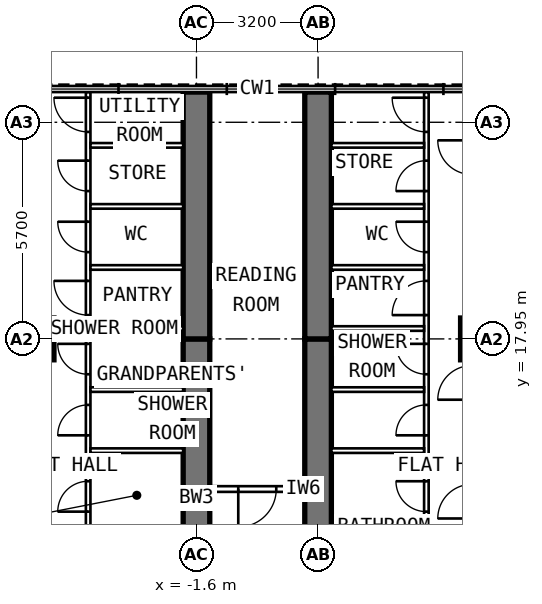
"""IFC4 building model, lengths in metres.
Left out: names, types, materials, properties, quantities, classifications, styles, units other than length and angle.
Written with IfcOpenShell. Run it as: python <this file> out.ifc"""

import sys

from ifc_helpers import new_model, si_unit, direction, frame, frame_2d, origin, origin_2d, place, context, subcontext, project, spatial, rectangle, extrude, element, fill, save


model = new_model("IFC4")
c1 = context("Model", 3, precision=1e-05, world=origin(), true_north=direction((0.0, 1.0)))
c2 = subcontext(c1, "Body", "Model", "MODEL_VIEW")
j1 = project(units=[si_unit("LENGTHUNIT", "METRE"), si_unit("PLANEANGLEUNIT", "RADIAN")], contexts=[c1])
p1 = place(None, origin())
s1 = spatial("IfcSite", under=j1, at=p1, CompositionType="ELEMENT")
p2 = place(p1, origin())
s2 = spatial("IfcBuilding", under=s1, at=p2, CompositionType="ELEMENT")
p3 = place(p2, frame((0.0, 0.0, 231.6)))
s3 = spatial("IfcBuildingStorey", under=s2, at=p3, CompositionType="ELEMENT", Elevation=231.6)
for number, where, z_axis, x_axis in (
    (1, (-5.9, 17.95, 0.0), (0.0, 0.0, 1.0), (0.0, 1.0, 0.0)),
    (2, (5.9, 17.95, 0.0), (0.0, 0.0, 1.0), (0.0, 1.0, 0.0)),
):
    element("IfcColumn", number, at=place(p3, frame(where, z_axis=z_axis, x_axis=x_axis)), inside=s3, PredefinedType="COLUMN", context=c2, shape_type="SweptSolid", body=[
        extrude(rectangle(XDim=1.1, YDim=1.1, at=origin_2d()), origin(), (0.0, 0.0, 1.0), 3.6),
    ])
p4 = place(p3, frame((-1.6, 9.6, 0.0), z_axis=(0.0, 0.0, 1.0), x_axis=(0.0, 1.0, 0.0)))
e3 = element("IfcWall", 3, at=p4, inside=s3, PredefinedType="SHEAR", context=c2, shape_type="SweptSolid", body=[
    extrude(rectangle(XDim=8.35, YDim=0.7, at=frame_2d((4.175, 0.0))), origin(), (0.0, 0.0, 1.0), 3.6),
])
p5 = place(p4, frame((1.3, 0.0, 0.0)))
e4 = element("IfcOpeningElement", 4, at=p5, cuts=e3, PredefinedType="OPENING", context=c2, shape_type="SweptSolid", body=[
    extrude(rectangle(XDim=1.0, YDim=2.1, at=frame_2d((0.5, 1.05))), frame((0.0, 0.362, 0.0), z_axis=(0.0, -1.0, 0.0), x_axis=(1.0, 0.0, 0.0)), (0.0, 0.0, 1.0), 0.724),
])
p6 = place(p3, frame((-1.6, 17.95, 0.0), z_axis=(0.0, 0.0, 1.0), x_axis=(0.0, 1.0, 0.0)))
e5 = element("IfcWall", 5, at=p6, inside=s3, PredefinedType="SHEAR", context=c2, shape_type="SweptSolid", body=[
    extrude(rectangle(XDim=6.495, YDim=0.7, at=frame_2d((3.248, 0.0))), origin(), (0.0, 0.0, 1.0), 3.6),
])
p7 = place(p3, frame((1.6, 9.6, 0.0), z_axis=(0.0, 0.0, 1.0), x_axis=(0.0, 1.0, 0.0)))
e6 = element("IfcWall", 6, at=p7, inside=s3, PredefinedType="SHEAR", context=c2, shape_type="SweptSolid", body=[
    extrude(rectangle(XDim=8.35, YDim=0.7, at=frame_2d((4.175, 0.0))), origin(), (0.0, 0.0, 1.0), 3.6),
])
p8 = place(p7, frame((1.3, 0.0, 0.0)))
e7 = element("IfcOpeningElement", 7, at=p8, cuts=e6, PredefinedType="OPENING", context=c2, shape_type="SweptSolid", body=[
    extrude(rectangle(XDim=1.0, YDim=2.1, at=frame_2d((0.5, 1.05))), frame((0.0, 0.362, 0.0), z_axis=(0.0, -1.0, 0.0), x_axis=(1.0, 0.0, 0.0)), (0.0, 0.0, 1.0), 0.724),
])
p9 = place(p3, frame((1.6, 17.95, 0.0), z_axis=(0.0, 0.0, 1.0), x_axis=(0.0, 1.0, 0.0)))
e8 = element("IfcWall", 8, at=p9, inside=s3, PredefinedType="SHEAR", context=c2, shape_type="SweptSolid", body=[
    extrude(rectangle(XDim=6.495, YDim=0.7, at=frame_2d((3.248, 0.0))), origin(), (0.0, 0.0, 1.0), 3.6),
])
p10 = place(p3, frame((-4.45, 9.9, 0.0), z_axis=(0.0, 0.0, 1.0), x_axis=(0.0, 1.0, 0.0)))
e9 = element("IfcWall", 9, at=p10, inside=s3, PredefinedType="PARTITIONING", context=c2, shape_type="SweptSolid", body=[
    extrude(rectangle(XDim=14.545, YDim=0.12, at=frame_2d((7.272, 0.0))), origin(), (0.0, 0.0, 1.0), 3.35),
])
p11 = place(p10, frame((0.95, 0.0, 0.0)))
e10 = element("IfcOpeningElement", 10, at=p11, cuts=e9, PredefinedType="OPENING", context=c2, shape_type="SweptSolid", body=[
    extrude(rectangle(XDim=0.9, YDim=2.1, at=frame_2d((0.45, 1.05))), frame((0.0, 0.072, 0.0), z_axis=(0.0, -1.0, 0.0), x_axis=(1.0, 0.0, 0.0)), (0.0, 0.0, 1.0), 0.144),
])
p12 = place(p10, frame((3.505, 0.0, 0.0)))
e11 = element("IfcOpeningElement", 11, at=p12, cuts=e9, PredefinedType="OPENING", context=c2, shape_type="SweptSolid", body=[
    extrude(rectangle(XDim=0.8, YDim=2.1, at=frame_2d((0.4, 1.05))), frame((0.0, 0.072, 0.0), z_axis=(0.0, -1.0, 0.0), x_axis=(1.0, 0.0, 0.0)), (0.0, 0.0, 1.0), 0.144),
])
p13 = place(p10, frame((5.513, 0.0, 0.0)))
e12 = element("IfcOpeningElement", 12, at=p13, cuts=e9, PredefinedType="OPENING", context=c2, shape_type="SweptSolid", body=[
    extrude(rectangle(XDim=0.8, YDim=2.1, at=frame_2d((0.4, 1.05))), frame((0.0, 0.072, 0.0), z_axis=(0.0, -1.0, 0.0), x_axis=(1.0, 0.0, 0.0)), (0.0, 0.0, 1.0), 0.144),
])
p14 = place(p10, frame((7.12, 0.0, 0.0)))
e13 = element("IfcOpeningElement", 13, at=p14, cuts=e9, PredefinedType="OPENING", context=c2, shape_type="SweptSolid", body=[
    extrude(rectangle(XDim=0.8, YDim=2.1, at=frame_2d((0.4, 1.05))), frame((0.0, 0.072, 0.0), z_axis=(0.0, -1.0, 0.0), x_axis=(1.0, 0.0, 0.0)), (0.0, 0.0, 1.0), 0.144),
])
p15 = place(p10, frame((8.677, 0.0, 0.0)))
e14 = element("IfcOpeningElement", 14, at=p15, cuts=e9, PredefinedType="OPENING", context=c2, shape_type="SweptSolid", body=[
    extrude(rectangle(XDim=0.9, YDim=2.1, at=frame_2d((0.45, 1.05))), frame((0.0, 0.072, 0.0), z_axis=(0.0, -1.0, 0.0), x_axis=(1.0, 0.0, 0.0)), (0.0, 0.0, 1.0), 0.144),
])
p16 = place(p10, frame((10.333, 0.0, 0.0)))
e15 = element("IfcOpeningElement", 15, at=p16, cuts=e9, PredefinedType="OPENING", context=c2, shape_type="SweptSolid", body=[
    extrude(rectangle(XDim=0.8, YDim=2.1, at=frame_2d((0.4, 1.05))), frame((0.0, 0.072, 0.0), z_axis=(0.0, -1.0, 0.0), x_axis=(1.0, 0.0, 0.0)), (0.0, 0.0, 1.0), 0.144),
])
p17 = place(p10, frame((11.94, 0.0, 0.0)))
e16 = element("IfcOpeningElement", 16, at=p17, cuts=e9, PredefinedType="OPENING", context=c2, shape_type="SweptSolid", body=[
    extrude(rectangle(XDim=0.8, YDim=2.1, at=frame_2d((0.4, 1.05))), frame((0.0, 0.072, 0.0), z_axis=(0.0, -1.0, 0.0), x_axis=(1.0, 0.0, 0.0)), (0.0, 0.0, 1.0), 0.144),
])
p18 = place(p10, frame((13.497, 0.0, 0.0)))
e17 = element("IfcOpeningElement", 17, at=p18, cuts=e9, PredefinedType="OPENING", context=c2, shape_type="SweptSolid", body=[
    extrude(rectangle(XDim=0.9, YDim=2.1, at=frame_2d((0.45, 1.05))), frame((0.0, 0.072, 0.0), z_axis=(0.0, -1.0, 0.0), x_axis=(1.0, 0.0, 0.0)), (0.0, 0.0, 1.0), 0.144),
])
for number, where, z_axis, x_axis in (
    (18, (-1.95, 15.01, 0.0), (0.0, 0.0, 1.0), (-1.0, 0.0, 0.0)),
    (19, (-1.95, 16.617, 0.0), (0.0, 0.0, 1.0), (-1.0, 0.0, 0.0)),
):
    element("IfcWall", number, at=place(p3, frame(where, z_axis=z_axis, x_axis=x_axis)), inside=s3, PredefinedType="PARTITIONING", context=c2, shape_type="SweptSolid", body=[
        extrude(rectangle(XDim=2.44, YDim=0.12, at=frame_2d((1.22, 0.0))), origin(), (0.0, 0.0, 1.0), 3.35),
    ])
p19 = place(p3, frame((-1.95, 18.223, 0.0), z_axis=(0.0, 0.0, 1.0), x_axis=(-1.0, 0.0, 0.0)))
e20 = element("IfcWall", 20, at=p19, inside=s3, PredefinedType="PARTITIONING", context=c2, shape_type="SweptSolid", body=[
    extrude(rectangle(XDim=2.44, YDim=0.12, at=frame_2d((1.22, 0.0))), origin(), (0.0, 0.0, 1.0), 2.45),
])
for number, where, z_axis, x_axis in (
    (21, (-1.95, 19.83, 0.0), (0.0, 0.0, 1.0), (-1.0, 0.0, 0.0)),
    (22, (-1.95, 21.437, 0.0), (0.0, 0.0, 1.0), (-1.0, 0.0, 0.0)),
    (23, (-1.95, 23.043, 0.0), (0.0, 0.0, 1.0), (-1.0, 0.0, 0.0)),
):
    element("IfcWall", number, at=place(p3, frame(where, z_axis=z_axis, x_axis=x_axis)), inside=s3, PredefinedType="PARTITIONING", context=c2, shape_type="SweptSolid", body=[
        extrude(rectangle(XDim=2.44, YDim=0.12, at=frame_2d((1.22, 0.0))), origin(), (0.0, 0.0, 1.0), 3.35),
    ])
p20 = place(p3, frame((4.45, 9.9, 0.0), z_axis=(0.0, 0.0, 1.0), x_axis=(0.0, 1.0, 0.0)))
e24 = element("IfcWall", 24, at=p20, inside=s3, PredefinedType="PARTITIONING", context=c2, shape_type="SweptSolid", body=[
    extrude(rectangle(XDim=14.545, YDim=0.12, at=frame_2d((7.272, 0.0))), origin(), (0.0, 0.0, 1.0), 3.35),
])
p21 = place(p20, frame((0.95, 0.0, 0.0)))
e25 = element("IfcOpeningElement", 25, at=p21, cuts=e24, PredefinedType="OPENING", context=c2, shape_type="SweptSolid", body=[
    extrude(rectangle(XDim=0.9, YDim=2.1, at=frame_2d((0.45, 1.05))), frame((0.0, 0.072, 0.0), z_axis=(0.0, -1.0, 0.0), x_axis=(1.0, 0.0, 0.0)), (0.0, 0.0, 1.0), 0.144),
])
p22 = place(p20, frame((3.505, 0.0, 0.0)))
e26 = element("IfcOpeningElement", 26, at=p22, cuts=e24, PredefinedType="OPENING", context=c2, shape_type="SweptSolid", body=[
    extrude(rectangle(XDim=0.8, YDim=2.1, at=frame_2d((0.4, 1.05))), frame((0.0, 0.072, 0.0), z_axis=(0.0, -1.0, 0.0), x_axis=(1.0, 0.0, 0.0)), (0.0, 0.0, 1.0), 0.144),
])
p23 = place(p20, frame((5.513, 0.0, 0.0)))
e27 = element("IfcOpeningElement", 27, at=p23, cuts=e24, PredefinedType="OPENING", context=c2, shape_type="SweptSolid", body=[
    extrude(rectangle(XDim=0.8, YDim=2.1, at=frame_2d((0.4, 1.05))), frame((0.0, 0.072, 0.0), z_axis=(0.0, -1.0, 0.0), x_axis=(1.0, 0.0, 0.0)), (0.0, 0.0, 1.0), 0.144),
])
p24 = place(p20, frame((7.12, 0.0, 0.0)))
e28 = element("IfcOpeningElement", 28, at=p24, cuts=e24, PredefinedType="OPENING", context=c2, shape_type="SweptSolid", body=[
    extrude(rectangle(XDim=0.8, YDim=2.1, at=frame_2d((0.4, 1.05))), frame((0.0, 0.072, 0.0), z_axis=(0.0, -1.0, 0.0), x_axis=(1.0, 0.0, 0.0)), (0.0, 0.0, 1.0), 0.144),
])
p25 = place(p20, frame((8.677, 0.0, 0.0)))
e29 = element("IfcOpeningElement", 29, at=p25, cuts=e24, PredefinedType="OPENING", context=c2, shape_type="SweptSolid", body=[
    extrude(rectangle(XDim=0.9, YDim=2.1, at=frame_2d((0.45, 1.05))), frame((0.0, 0.072, 0.0), z_axis=(0.0, -1.0, 0.0), x_axis=(1.0, 0.0, 0.0)), (0.0, 0.0, 1.0), 0.144),
])
p26 = place(p20, frame((10.333, 0.0, 0.0)))
e30 = element("IfcOpeningElement", 30, at=p26, cuts=e24, PredefinedType="OPENING", context=c2, shape_type="SweptSolid", body=[
    extrude(rectangle(XDim=0.8, YDim=2.1, at=frame_2d((0.4, 1.05))), frame((0.0, 0.072, 0.0), z_axis=(0.0, -1.0, 0.0), x_axis=(1.0, 0.0, 0.0)), (0.0, 0.0, 1.0), 0.144),
])
p27 = place(p20, frame((11.94, 0.0, 0.0)))
e31 = element("IfcOpeningElement", 31, at=p27, cuts=e24, PredefinedType="OPENING", context=c2, shape_type="SweptSolid", body=[
    extrude(rectangle(XDim=0.8, YDim=2.1, at=frame_2d((0.4, 1.05))), frame((0.0, 0.072, 0.0), z_axis=(0.0, -1.0, 0.0), x_axis=(1.0, 0.0, 0.0)), (0.0, 0.0, 1.0), 0.144),
])
p28 = place(p20, frame((13.497, 0.0, 0.0)))
e32 = element("IfcOpeningElement", 32, at=p28, cuts=e24, PredefinedType="OPENING", context=c2, shape_type="SweptSolid", body=[
    extrude(rectangle(XDim=0.9, YDim=2.1, at=frame_2d((0.45, 1.05))), frame((0.0, 0.072, 0.0), z_axis=(0.0, -1.0, 0.0), x_axis=(1.0, 0.0, 0.0)), (0.0, 0.0, 1.0), 0.144),
])
for number, where, z_axis, x_axis in (
    (33, (1.95, 15.01, 0.0), (0.0, 0.0, 1.0), (1.0, 0.0, 0.0)),
    (34, (1.95, 16.617, 0.0), (0.0, 0.0, 1.0), (1.0, 0.0, 0.0)),
):
    element("IfcWall", number, at=place(p3, frame(where, z_axis=z_axis, x_axis=x_axis)), inside=s3, PredefinedType="PARTITIONING", context=c2, shape_type="SweptSolid", body=[
        extrude(rectangle(XDim=2.44, YDim=0.12, at=frame_2d((1.22, 0.0))), origin(), (0.0, 0.0, 1.0), 3.35),
    ])
p29 = place(p3, frame((1.95, 18.223, 0.0), z_axis=(0.0, 0.0, 1.0), x_axis=(1.0, 0.0, 0.0)))
e35 = element("IfcWall", 35, at=p29, inside=s3, PredefinedType="PARTITIONING", context=c2, shape_type="SweptSolid", body=[
    extrude(rectangle(XDim=2.44, YDim=0.12, at=frame_2d((1.22, 0.0))), origin(), (0.0, 0.0, 1.0), 2.45),
])
for number, where, z_axis, x_axis in (
    (36, (1.95, 19.83, 0.0), (0.0, 0.0, 1.0), (1.0, 0.0, 0.0)),
    (37, (1.95, 21.437, 0.0), (0.0, 0.0, 1.0), (1.0, 0.0, 0.0)),
    (38, (1.95, 23.043, 0.0), (0.0, 0.0, 1.0), (1.0, 0.0, 0.0)),
):
    element("IfcWall", number, at=place(p3, frame(where, z_axis=z_axis, x_axis=x_axis)), inside=s3, PredefinedType="PARTITIONING", context=c2, shape_type="SweptSolid", body=[
        extrude(rectangle(XDim=2.44, YDim=0.12, at=frame_2d((1.22, 0.0))), origin(), (0.0, 0.0, 1.0), 3.35),
    ])
p30 = place(p3, frame((1.25, 14.0, 0.0), z_axis=(0.0, 0.0, 1.0), x_axis=(-1.0, 0.0, 0.0)))
e39 = element("IfcWall", 39, at=p30, inside=s3, PredefinedType="PARTITIONING", context=c2, shape_type="SweptSolid", body=[
    extrude(rectangle(XDim=2.5, YDim=0.15, at=frame_2d((1.25, 0.0))), origin(), (0.0, 0.0, 1.0), 3.35),
])
p31 = place(p30, frame((0.75, 0.0, 0.0)))
e40 = element("IfcOpeningElement", 40, at=p31, cuts=e39, PredefinedType="OPENING", context=c2, shape_type="SweptSolid", body=[
    extrude(rectangle(XDim=1.0, YDim=2.1, at=frame_2d((0.5, 1.05))), frame((0.0, 0.087, 0.0), z_axis=(0.0, -1.0, 0.0), x_axis=(1.0, 0.0, 0.0)), (0.0, 0.0, 1.0), 0.174),
])
p32 = place(p12, origin())
e41 = element("IfcDoor", 41, at=p32, inside=s3, OperationType="SINGLE_SWING_LEFT", PredefinedType="DOOR", context=c2, shape_type="SweptSolid", body=[
    extrude(rectangle(XDim=0.8, YDim=2.1, at=frame_2d((0.4, 1.05))), frame((0.0, 0.025, 0.0), z_axis=(0.0, -1.0, 0.0), x_axis=(1.0, 0.0, 0.0)), (0.0, 0.0, 1.0), 0.05),
])
fill(e11, e41)
p33 = place(p13, origin())
e42 = element("IfcDoor", 42, at=p33, inside=s3, OperationType="SINGLE_SWING_LEFT", PredefinedType="DOOR", context=c2, shape_type="SweptSolid", body=[
    extrude(rectangle(XDim=0.8, YDim=2.1, at=frame_2d((0.4, 1.05))), frame((0.0, 0.025, 0.0), z_axis=(0.0, -1.0, 0.0), x_axis=(1.0, 0.0, 0.0)), (0.0, 0.0, 1.0), 0.05),
])
fill(e12, e42)
p34 = place(p14, origin())
e43 = element("IfcDoor", 43, at=p34, inside=s3, OperationType="SINGLE_SWING_RIGHT", PredefinedType="DOOR", context=c2, shape_type="SweptSolid", body=[
    extrude(rectangle(XDim=0.8, YDim=2.1, at=frame_2d((0.4, 1.05))), frame((0.0, 0.025, 0.0), z_axis=(0.0, -1.0, 0.0), x_axis=(1.0, 0.0, 0.0)), (0.0, 0.0, 1.0), 0.05),
])
fill(e13, e43)
p35 = place(p15, origin())
e44 = element("IfcDoor", 44, at=p35, inside=s3, OperationType="SINGLE_SWING_RIGHT", PredefinedType="DOOR", context=c2, shape_type="SweptSolid", body=[
    extrude(rectangle(XDim=0.9, YDim=2.1, at=frame_2d((0.45, 1.05))), frame((0.0, 0.025, 0.0), z_axis=(0.0, -1.0, 0.0), x_axis=(1.0, 0.0, 0.0)), (0.0, 0.0, 1.0), 0.05),
])
fill(e14, e44)
p36 = place(p16, origin())
e45 = element("IfcDoor", 45, at=p36, inside=s3, OperationType="SINGLE_SWING_RIGHT", PredefinedType="DOOR", context=c2, shape_type="SweptSolid", body=[
    extrude(rectangle(XDim=0.8, YDim=2.1, at=frame_2d((0.4, 1.05))), frame((0.0, 0.025, 0.0), z_axis=(0.0, -1.0, 0.0), x_axis=(1.0, 0.0, 0.0)), (0.0, 0.0, 1.0), 0.05),
])
fill(e15, e45)
p37 = place(p17, origin())
e46 = element("IfcDoor", 46, at=p37, inside=s3, OperationType="SINGLE_SWING_RIGHT", PredefinedType="DOOR", context=c2, shape_type="SweptSolid", body=[
    extrude(rectangle(XDim=0.8, YDim=2.1, at=frame_2d((0.4, 1.05))), frame((0.0, 0.025, 0.0), z_axis=(0.0, -1.0, 0.0), x_axis=(1.0, 0.0, 0.0)), (0.0, 0.0, 1.0), 0.05),
])
fill(e16, e46)
p38 = place(p18, origin())
e47 = element("IfcDoor", 47, at=p38, inside=s3, OperationType="SINGLE_SWING_RIGHT", PredefinedType="DOOR", context=c2, shape_type="SweptSolid", body=[
    extrude(rectangle(XDim=0.9, YDim=2.1, at=frame_2d((0.45, 1.05))), frame((0.0, 0.025, 0.0), z_axis=(0.0, -1.0, 0.0), x_axis=(1.0, 0.0, 0.0)), (0.0, 0.0, 1.0), 0.05),
])
fill(e17, e47)
p39 = place(p22, origin())
e48 = element("IfcDoor", 48, at=p39, inside=s3, OperationType="SINGLE_SWING_RIGHT", PredefinedType="DOOR", context=c2, shape_type="SweptSolid", body=[
    extrude(rectangle(XDim=0.8, YDim=2.1, at=frame_2d((0.4, 1.05))), frame((0.0, 0.025, 0.0), z_axis=(0.0, -1.0, 0.0), x_axis=(1.0, 0.0, 0.0)), (0.0, 0.0, 1.0), 0.05),
])
fill(e26, e48)
p40 = place(p23, origin())
e49 = element("IfcDoor", 49, at=p40, inside=s3, OperationType="SINGLE_SWING_LEFT", PredefinedType="DOOR", context=c2, shape_type="SweptSolid", body=[
    extrude(rectangle(XDim=0.8, YDim=2.1, at=frame_2d((0.4, 1.05))), frame((0.0, 0.025, 0.0), z_axis=(0.0, -1.0, 0.0), x_axis=(1.0, 0.0, 0.0)), (0.0, 0.0, 1.0), 0.05),
])
fill(e27, e49)
p41 = place(p24, origin())
e50 = element("IfcDoor", 50, at=p41, inside=s3, OperationType="SINGLE_SWING_RIGHT", PredefinedType="DOOR", context=c2, shape_type="SweptSolid", body=[
    extrude(rectangle(XDim=0.8, YDim=2.1, at=frame_2d((0.4, 1.05))), frame((0.0, 0.025, 0.0), z_axis=(0.0, -1.0, 0.0), x_axis=(1.0, 0.0, 0.0)), (0.0, 0.0, 1.0), 0.05),
])
fill(e28, e50)
p42 = place(p25, origin())
e51 = element("IfcDoor", 51, at=p42, inside=s3, OperationType="SINGLE_SWING_LEFT", PredefinedType="DOOR", context=c2, shape_type="SweptSolid", body=[
    extrude(rectangle(XDim=0.9, YDim=2.1, at=frame_2d((0.45, 1.05))), frame((0.0, 0.025, 0.0), z_axis=(0.0, -1.0, 0.0), x_axis=(1.0, 0.0, 0.0)), (0.0, 0.0, 1.0), 0.05),
])
fill(e29, e51)
p43 = place(p26, origin())
e52 = element("IfcDoor", 52, at=p43, inside=s3, OperationType="SINGLE_SWING_RIGHT", PredefinedType="DOOR", context=c2, shape_type="SweptSolid", body=[
    extrude(rectangle(XDim=0.8, YDim=2.1, at=frame_2d((0.4, 1.05))), frame((0.0, 0.025, 0.0), z_axis=(0.0, -1.0, 0.0), x_axis=(1.0, 0.0, 0.0)), (0.0, 0.0, 1.0), 0.05),
])
fill(e30, e52)
p44 = place(p27, origin())
e53 = element("IfcDoor", 53, at=p44, inside=s3, OperationType="SINGLE_SWING_LEFT", PredefinedType="DOOR", context=c2, shape_type="SweptSolid", body=[
    extrude(rectangle(XDim=0.8, YDim=2.1, at=frame_2d((0.4, 1.05))), frame((0.0, 0.025, 0.0), z_axis=(0.0, -1.0, 0.0), x_axis=(1.0, 0.0, 0.0)), (0.0, 0.0, 1.0), 0.05),
])
fill(e31, e53)
p45 = place(p28, origin())
e54 = element("IfcDoor", 54, at=p45, inside=s3, OperationType="SINGLE_SWING_RIGHT", PredefinedType="DOOR", context=c2, shape_type="SweptSolid", body=[
    extrude(rectangle(XDim=0.9, YDim=2.1, at=frame_2d((0.45, 1.05))), frame((0.0, 0.025, 0.0), z_axis=(0.0, -1.0, 0.0), x_axis=(1.0, 0.0, 0.0)), (0.0, 0.0, 1.0), 0.05),
])
fill(e32, e54)
p46 = place(p31, origin())
e55 = element("IfcDoor", 55, at=p46, inside=s3, OperationType="SINGLE_SWING_RIGHT", PredefinedType="DOOR", context=c2, shape_type="SweptSolid", body=[
    extrude(rectangle(XDim=1.0, YDim=2.1, at=frame_2d((0.5, 1.05))), frame((0.0, 0.025, 0.0), z_axis=(0.0, -1.0, 0.0), x_axis=(1.0, 0.0, 0.0)), (0.0, 0.0, 1.0), 0.05),
])
fill(e40, e55)
save(model, sys.argv[1])
